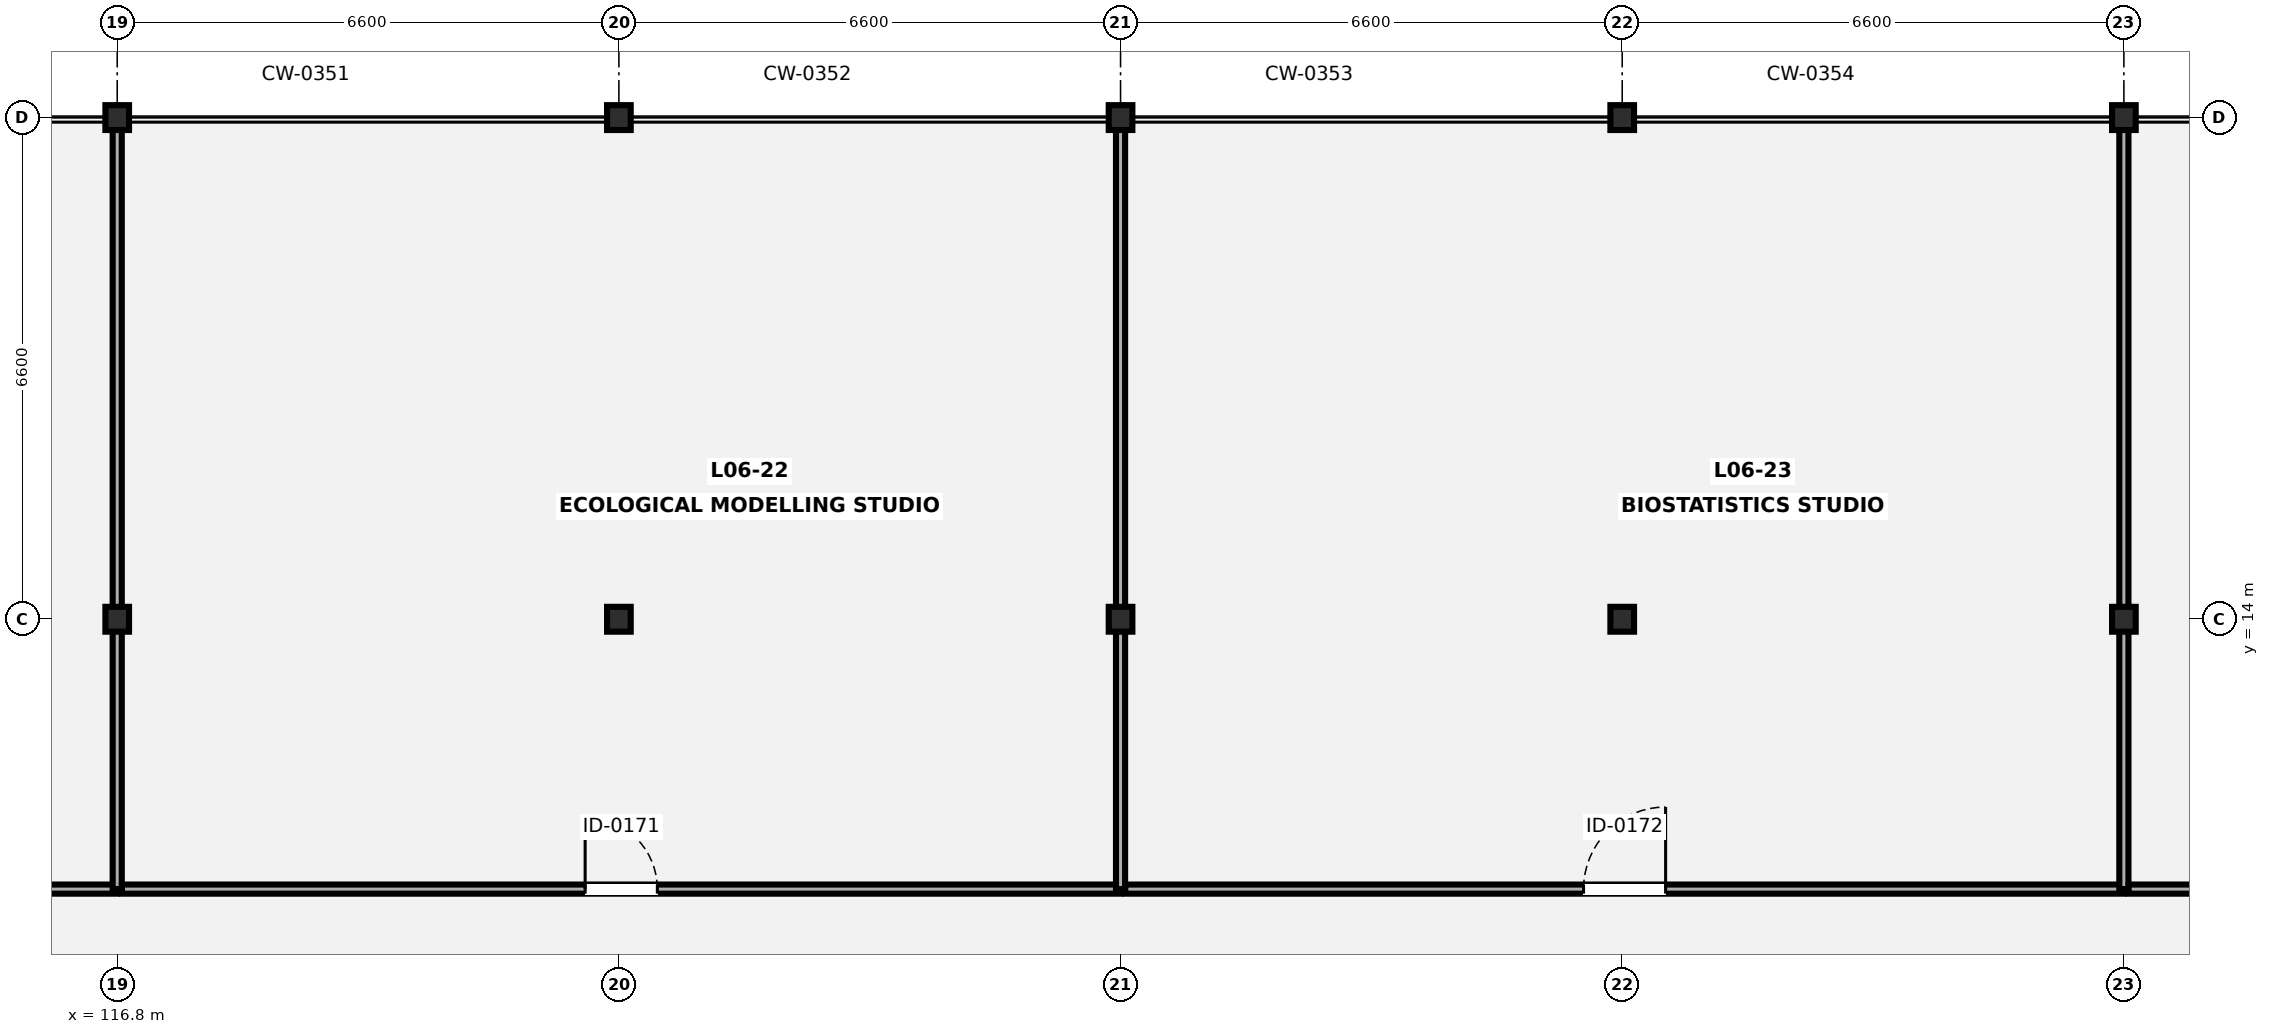
"""IFC4 building model, lengths in metres.
Left out: names, types, materials, properties, quantities, classifications, styles, units other than length and angle.
Written with IfcOpenShell. Run it as: python <this file> out.ifc"""

import sys

from ifc_helpers import new_model, si_unit, direction, frame, frame_2d, origin, origin_2d, place, context, subcontext, project, spatial, rectangle, i_section, extrude, element, fill, save


model = new_model("IFC4")
c1 = context("Model", 3, precision=1e-05, world=origin(), true_north=direction((0.0, 1.0)))
c2 = subcontext(c1, "Body", "Model", "MODEL_VIEW")
j1 = project(units=[si_unit("LENGTHUNIT", "METRE"), si_unit("PLANEANGLEUNIT", "RADIAN")], contexts=[c1])
p1 = place(None, origin())
s1 = spatial("IfcSite", under=j1, at=p1, CompositionType="ELEMENT")
p2 = place(p1, origin())
s2 = spatial("IfcBuilding", under=s1, at=p2, CompositionType="ELEMENT")
p3 = place(p2, frame((0.0, 0.0, 25.9)))
s3 = spatial("IfcBuildingStorey", under=s2, at=p3, CompositionType="ELEMENT", Elevation=25.9)
for number, where, z_axis, x_axis in (
    (1, (116.8, 14.0, 0.0), (0.0, 0.0, 1.0), (1.0, 0.0, 0.0)),
    (2, (116.8, 20.6, 0.0), (0.0, 0.0, 1.0), (1.0, 0.0, 0.0)),
    (3, (123.4, 14.0, 0.0), (0.0, 0.0, 1.0), (1.0, 0.0, 0.0)),
    (4, (123.4, 20.6, 0.0), (0.0, 0.0, 1.0), (1.0, 0.0, 0.0)),
    (5, (130.0, 14.0, 0.0), (0.0, 0.0, 1.0), (1.0, 0.0, 0.0)),
    (6, (130.0, 20.6, 0.0), (0.0, 0.0, 1.0), (1.0, 0.0, 0.0)),
    (7, (136.6, 14.0, 0.0), (0.0, 0.0, 1.0), (1.0, 0.0, 0.0)),
    (8, (136.6, 20.6, 0.0), (0.0, 0.0, 1.0), (1.0, 0.0, 0.0)),
    (9, (143.2, 14.0, 0.0), (0.0, 0.0, 1.0), (1.0, 0.0, 0.0)),
    (10, (143.2, 20.6, 0.0), (0.0, 0.0, 1.0), (1.0, 0.0, 0.0)),
):
    element("IfcColumn", number, at=place(p3, frame(where, z_axis=z_axis, x_axis=x_axis)), inside=s3, PredefinedType="COLUMN", context=c2, shape_type="SweptSolid", body=[
        extrude(i_section(OverallWidth=0.311, OverallDepth=0.327, WebThickness=0.016, FlangeThickness=0.025, FilletRadius=0.017, at=origin_2d()), origin(), (0.0, 0.0, 1.0), 4.2),
    ])
p4 = place(p3, frame((103.6, 10.45, 0.0), z_axis=(0.0, 0.0, 1.0), x_axis=(1.0, 0.0, 0.0)))
e11 = element("IfcWall", 11, at=p4, inside=s3, PredefinedType="PARTITIONING", context=c2, shape_type="SweptSolid", body=[
    extrude(rectangle(XDim=13.2, YDim=0.12, at=frame_2d((6.6, 0.0))), origin(), (0.0, 0.0, 1.0), 3.546),
])
p5 = place(p4, frame((6.06, 0.0, 0.0)))
e12 = element("IfcOpeningElement", 12, at=p5, cuts=e11, PredefinedType="OPENING", context=c2, shape_type="SweptSolid", body=[
    extrude(rectangle(XDim=1.08, YDim=2.12, at=frame_2d((0.54, 1.06))), frame((0.0, 0.07, 0.0), z_axis=(0.0, -1.0, 0.0), x_axis=(1.0, 0.0, 0.0)), (0.0, 0.0, 1.0), 0.14),
])
p6 = place(p3, frame((116.8, 10.45, 0.0), z_axis=(0.0, 0.0, 1.0), x_axis=(0.0, 1.0, 0.0)))
e13 = element("IfcWall", 13, at=p6, inside=s3, PredefinedType="PARTITIONING", context=c2, shape_type="SweptSolid", body=[
    extrude(rectangle(XDim=10.15, YDim=0.12, at=frame_2d((5.075, 0.0))), origin(), (0.0, 0.0, 1.0), 3.372),
])
p7 = place(p3, frame((116.862, 10.45, 0.0), z_axis=(0.0, 0.0, 1.0), x_axis=(1.0, 0.0, 0.0)))
e14 = element("IfcWall", 14, at=p7, inside=s3, PredefinedType="PARTITIONING", context=c2, shape_type="SweptSolid", body=[
    extrude(rectangle(XDim=13.138, YDim=0.12, at=frame_2d((6.569, 0.0))), origin(), (0.0, 0.0, 1.0), 3.546),
])
p8 = place(p7, frame((6.094, 0.0, 0.0)))
e15 = element("IfcOpeningElement", 15, at=p8, cuts=e14, PredefinedType="OPENING", context=c2, shape_type="SweptSolid", body=[
    extrude(rectangle(XDim=0.95, YDim=2.1, at=frame_2d((0.475, 1.05))), frame((0.0, 0.07, 0.0), z_axis=(0.0, -1.0, 0.0), x_axis=(1.0, 0.0, 0.0)), (0.0, 0.0, 1.0), 0.14),
])
p9 = place(p3, frame((130.0, 10.45, 0.0), z_axis=(0.0, 0.0, 1.0), x_axis=(0.0, 1.0, 0.0)))
e16 = element("IfcWall", 16, at=p9, inside=s3, PredefinedType="PARTITIONING", context=c2, shape_type="SweptSolid", body=[
    extrude(rectangle(XDim=10.063, YDim=0.12, at=frame_2d((5.031, 0.0))), origin(), (0.0, 0.0, 1.0), 3.372),
])
p10 = place(p3, frame((130.062, 10.45, 0.0), z_axis=(0.0, 0.0, 1.0), x_axis=(1.0, 0.0, 0.0)))
e17 = element("IfcWall", 17, at=p10, inside=s3, PredefinedType="PARTITIONING", context=c2, shape_type="SweptSolid", body=[
    extrude(rectangle(XDim=13.138, YDim=0.12, at=frame_2d((6.569, 0.0))), origin(), (0.0, 0.0, 1.0), 3.546),
])
p11 = place(p10, frame((6.029, 0.0, 0.0)))
e18 = element("IfcOpeningElement", 18, at=p11, cuts=e17, PredefinedType="OPENING", context=c2, shape_type="SweptSolid", body=[
    extrude(rectangle(XDim=1.08, YDim=2.12, at=frame_2d((0.54, 1.06))), frame((0.0, 0.07, 0.0), z_axis=(0.0, -1.0, 0.0), x_axis=(1.0, 0.0, 0.0)), (0.0, 0.0, 1.0), 0.14),
])
p12 = place(p3, frame((143.2, 10.45, 0.0), z_axis=(0.0, 0.0, 1.0), x_axis=(0.0, 1.0, 0.0)))
e19 = element("IfcWall", 19, at=p12, inside=s3, PredefinedType="PARTITIONING", context=c2, shape_type="SweptSolid", body=[
    extrude(rectangle(XDim=10.063, YDim=0.12, at=frame_2d((5.031, 0.0))), origin(), (0.0, 0.0, 1.0), 3.372),
])
p13 = place(p3, frame((143.262, 10.45, 0.0), z_axis=(0.0, 0.0, 1.0), x_axis=(1.0, 0.0, 0.0)))
e20 = element("IfcWall", 20, at=p13, inside=s3, PredefinedType="PARTITIONING", context=c2, shape_type="SweptSolid", body=[
    extrude(rectangle(XDim=13.138, YDim=0.12, at=frame_2d((6.569, 0.0))), origin(), (0.0, 0.0, 1.0), 3.546),
])
p14 = place(p13, frame((5.844, 0.0, 0.0)))
e21 = element("IfcOpeningElement", 21, at=p14, cuts=e20, PredefinedType="OPENING", context=c2, shape_type="SweptSolid", body=[
    extrude(rectangle(XDim=1.45, YDim=2.12, at=frame_2d((0.725, 1.06))), frame((0.0, 0.07, 0.0), z_axis=(0.0, -1.0, 0.0), x_axis=(1.0, 0.0, 0.0)), (0.0, 0.0, 1.0), 0.14),
])
p15 = place(p8, origin())
e22 = element("IfcDoor", 22, at=p15, inside=s3, OperationType="SINGLE_SWING_LEFT", PredefinedType="DOOR", context=c2, shape_type="SweptSolid", body=[
    extrude(rectangle(XDim=0.95, YDim=2.1, at=frame_2d((0.475, 1.05))), frame((0.0, 0.025, 0.0), z_axis=(0.0, -1.0, 0.0), x_axis=(1.0, 0.0, 0.0)), (0.0, 0.0, 1.0), 0.05),
])
fill(e15, e22)
p16 = place(p11, origin())
e23 = element("IfcDoor", 23, at=p16, inside=s3, OperationType="SINGLE_SWING_RIGHT", PredefinedType="DOOR", context=c2, shape_type="SweptSolid", body=[
    extrude(rectangle(XDim=1.08, YDim=2.12, at=frame_2d((0.54, 1.06))), frame((0.0, 0.025, 0.0), z_axis=(0.0, -1.0, 0.0), x_axis=(1.0, 0.0, 0.0)), (0.0, 0.0, 1.0), 0.05),
])
fill(e18, e23)
save(model, sys.argv[1])
